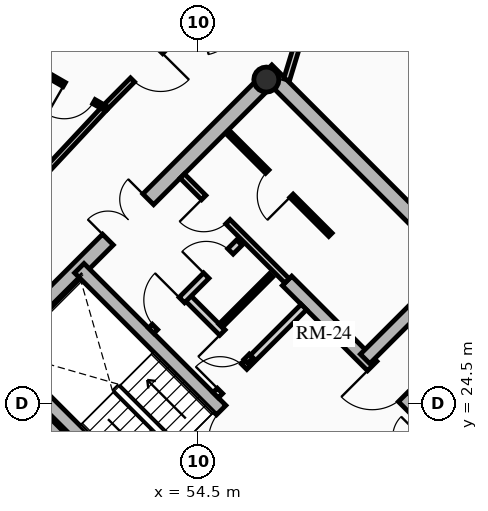
"""IFC4 building model, lengths in metres.
Left out: names, types, materials, properties, quantities, classifications, styles, units other than length and angle.
Written with IfcOpenShell. Run it as: python <this file> out.ifc"""

import sys

from ifc_helpers import new_model, si_unit, direction, frame, frame_2d, origin, origin_2d, place, context, subcontext, project, spatial, rectangle, hollow_circle, extrude, source, transform, mapped, element, fill, save


model = new_model("IFC4")
c1 = context("Model", 3, precision=1e-05, world=origin(), true_north=direction((0.0, 1.0)))
c2 = subcontext(c1, "Body", "Model", "MODEL_VIEW")
j1 = project(units=[si_unit("LENGTHUNIT", "METRE"), si_unit("PLANEANGLEUNIT", "RADIAN")], contexts=[c1])
p1 = place(None, origin())
s1 = spatial("IfcSite", under=j1, at=p1, CompositionType="ELEMENT")
p2 = place(p1, origin())
s2 = spatial("IfcBuilding", under=s1, at=p2, CompositionType="ELEMENT")
p3 = place(p2, frame((0.0, 0.0, 208.3)))
s3 = spatial("IfcBuildingStorey", under=s2, at=p3, CompositionType="ELEMENT", Elevation=208.3)
for number, where, z_axis, x_axis in (
    (1, (58.702, 15.732, 0.0), (0.0, 0.0, 1.0), (-0.707, 0.707, 0.0)),
    (2, (66.268, 23.298, 0.0), (0.0, 0.0, 1.0), (-0.707, 0.707, 0.0)),
):
    element("IfcWall", number, at=place(p3, frame(where, z_axis=z_axis, x_axis=x_axis)), inside=s3, PredefinedType="SHEAR", context=c2, shape_type="SweptSolid", body=[
        extrude(rectangle(XDim=14.1, YDim=0.4, at=frame_2d((7.05, 0.0))), origin(), (0.0, 0.0, 1.0), 2.91),
    ])
p4 = place(p3, frame((48.873, 25.561, 0.0), z_axis=(0.0, 0.0, 1.0), x_axis=(0.707106781187, 0.707106781187, 0.0)))
e3 = element("IfcWall", 3, at=p4, inside=s3, PredefinedType="SHEAR", context=c2, shape_type="SweptSolid", body=[
    extrude(rectangle(XDim=10.7, YDim=0.4, at=frame_2d((5.35, 0.0))), origin(), (0.0, 0.0, 1.0), 2.91),
])
m1 = source(origin(), c2, "Body", "SweptSolid", [
    extrude(rectangle(XDim=1.5, YDim=2.02, at=frame_2d((0.75, 1.01))), frame((0.0, 0.21, 0.0), z_axis=(0.0, -1.0, 0.0), x_axis=(1.0, 0.0, 0.0)), (0.0, 0.0, 1.0), 0.42),
])
p5 = place(p4, frame((4.6, 0.0, 0.0)))
e4 = element("IfcOpeningElement", 4, at=p5, cuts=e3, PredefinedType="OPENING", context=c2, shape_type="MappedRepresentation", body=[
    mapped(m1, transform((0.0, 0.0, 0.0), x_axis=(1.0, 0.0, 0.0), y_axis=(0.0, 1.0, 0.0), z_axis=(0.0, 0.0, 1.0), scale=1.0)),
])
p6 = place(p3, frame((61.06, 18.373, 0.0), z_axis=(0.0, 0.0, 1.0), x_axis=(-0.707106781187, 0.707106781187, 0.0)))
e5 = element("IfcWall", 5, at=p6, inside=s3, PredefinedType="SHEAR", context=c2, shape_type="SweptSolid", body=[
    extrude(rectangle(XDim=13.7, YDim=0.35, at=frame_2d((6.85, 0.0))), origin(), (0.0, 0.0, 1.0), 2.91),
])
m2 = source(origin(), c2, "Body", "SweptSolid", [
    extrude(rectangle(XDim=1.1, YDim=2.015, at=frame_2d((0.55, 1.007))), frame((0.0, 0.185, 0.0), z_axis=(0.0, -1.0, 0.0), x_axis=(1.0, 0.0, 0.0)), (0.0, 0.0, 1.0), 0.37),
])
p7 = place(p6, frame((4.85, 0.0, 0.0)))
e6 = element("IfcOpeningElement", 6, at=p7, cuts=e5, PredefinedType="OPENING", context=c2, shape_type="MappedRepresentation", body=[
    mapped(m2, transform((0.0, 0.0, 0.0), x_axis=(1.0, 0.0, 0.0), y_axis=(0.0, 1.0, 0.0), z_axis=(0.0, 0.0, 1.0), scale=1.0)),
])
p8 = place(p6, frame((0.625, 0.0, 0.0)))
e7 = element("IfcOpeningElement", 7, at=p8, cuts=e5, PredefinedType="OPENING", context=c2, shape_type="MappedRepresentation", body=[
    mapped(m2, transform((0.0, 0.0, 0.0), x_axis=(1.0, 0.0, 0.0), y_axis=(0.0, 1.0, 0.0), z_axis=(0.0, 0.0, 1.0), scale=1.0)),
])
p9 = place(p6, frame((2.625, 0.0, 0.0)))
e8 = element("IfcOpeningElement", 8, at=p9, cuts=e5, PredefinedType="OPENING", context=c2, shape_type="MappedRepresentation", body=[
    mapped(m2, transform((0.0, 0.0, 0.0), x_axis=(1.0, 0.0, 0.0), y_axis=(0.0, 1.0, 0.0), z_axis=(0.0, 0.0, 1.0), scale=1.0)),
])
m3 = source(origin(), c2, "Body", "SweptSolid", [
    extrude(rectangle(XDim=1.15, YDim=2.02, at=frame_2d((0.575, 1.01))), frame((0.0, 0.185, 0.0), z_axis=(0.0, -1.0, 0.0), x_axis=(1.0, 0.0, 0.0)), (0.0, 0.0, 1.0), 0.37),
])
p10 = place(p6, frame((7.27, 0.0, 0.0)))
e9 = element("IfcOpeningElement", 9, at=p10, cuts=e5, PredefinedType="OPENING", context=c2, shape_type="MappedRepresentation", body=[
    mapped(m3, transform((0.0, 0.0, 0.0), x_axis=(1.0, 0.0, 0.0), y_axis=(0.0, 1.0, 0.0), z_axis=(0.0, 0.0, 1.0), scale=1.0)),
])
p11 = place(p3, frame((63.627, 20.94, 0.0), z_axis=(0.0, 0.0, 1.0), x_axis=(-0.707119496762, 0.707094065383, 0.0)))
e10 = element("IfcWall", 10, at=p11, inside=s3, PredefinedType="SHEAR", context=c2, shape_type="SweptSolid", body=[
    extrude(rectangle(XDim=9.6, YDim=0.35, at=frame_2d((4.8, 0.0))), origin(), (0.0, 0.0, 1.0), 2.91),
])
p12 = place(p11, frame((5.28, 0.0, 0.0)))
e11 = element("IfcOpeningElement", 11, at=p12, cuts=e10, PredefinedType="OPENING", context=c2, shape_type="MappedRepresentation", body=[
    mapped(m3, transform((0.0, 0.0, 0.0), x_axis=(1.0, 0.0, 0.0), y_axis=(0.0, 1.0, 0.0), z_axis=(0.0, 0.0, 1.0), scale=1.0)),
])
p13 = place(p3, frame((53.922, 21.141, 0.0), z_axis=(0.0, 0.0, 1.0), x_axis=(-0.707106781187, 0.707106781187, 0.0)))
e12 = element("IfcWall", 12, at=p13, inside=s3, PredefinedType="SHEAR", context=c2, shape_type="SweptSolid", body=[
    extrude(rectangle(XDim=6.695, YDim=0.35, at=frame_2d((3.348, 0.0))), origin(), (0.0, 0.0, 1.0), 2.91),
])
p14 = place(p3, frame((58.893, 25.674, 0.0), z_axis=(0.0, 0.0, 1.0), x_axis=(0.707106781187, 0.707106781187, 0.0)))
e13 = element("IfcWall", 13, at=p14, inside=s3, PredefinedType="SHEAR", context=c2, shape_type="SweptSolid", body=[
    extrude(rectangle(XDim=3.285, YDim=0.35, at=frame_2d((1.643, 0.0))), origin(), (0.0, 0.0, 1.0), 2.91),
])
p15 = place(p3, frame((56.294, 33.024, 0.0), z_axis=(0.0, 0.0, 1.0), x_axis=(0.707106781187, 0.707106781187, 0.0)))
e14 = element("IfcColumn", 14, at=p15, inside=s3, PredefinedType="COLUMN", context=c2, shape_type="SweptSolid", body=[
    extrude(hollow_circle(Radius=0.33, WallThickness=0.025, at=origin_2d()), origin(), (0.0, 0.0, 1.0), 2.91),
])
p16 = place(p3, frame((58.214, 21.467, 0.0), z_axis=(0.0, 0.0, 1.0), x_axis=(0.707106781187, 0.707106781187, 0.0)))
e15 = element("IfcWall", 15, at=p16, inside=s3, PredefinedType="PARTITIONING", context=c2, shape_type="SweptSolid", body=[
    extrude(rectangle(XDim=3.28, YDim=0.2, at=frame_2d((1.64, 0.0))), origin(), (0.0, 0.0, 1.0), 2.685),
])
m4 = source(origin(), c2, "Body", "SweptSolid", [
    extrude(rectangle(XDim=1.5, YDim=2.02, at=frame_2d((0.75, 1.01))), frame((0.0, 0.11, 0.0), z_axis=(0.0, -1.0, 0.0), x_axis=(1.0, 0.0, 0.0)), (0.0, 0.0, 1.0), 0.22),
])
p17 = place(p16, frame((1.55, 0.0, 0.0)))
e16 = element("IfcOpeningElement", 16, at=p17, cuts=e15, PredefinedType="OPENING", context=c2, shape_type="MappedRepresentation", body=[
    mapped(m4, transform((0.0, 0.0, 0.0), x_axis=(1.0, 0.0, 0.0), y_axis=(0.0, 1.0, 0.0), z_axis=(0.0, 0.0, 1.0), scale=1.0)),
])
p18 = place(p3, frame((54.961, 24.719, 0.0), z_axis=(0.0, 0.0, 1.0), x_axis=(0.707106781187, 0.707106781187, 0.0)))
e17 = element("IfcWall", 17, at=p18, inside=s3, PredefinedType="PARTITIONING", context=c2, shape_type="SweptSolid", body=[
    extrude(rectangle(XDim=3.28, YDim=0.2, at=frame_2d((1.64, 0.0))), origin(), (0.0, 0.0, 1.0), 2.685),
])
m5 = source(origin(), c2, "Body", "SweptSolid", [
    extrude(rectangle(XDim=0.9, YDim=2.005, at=frame_2d((0.45, 1.002))), frame((0.0, 0.11, 0.0), z_axis=(0.0, -1.0, 0.0), x_axis=(1.0, 0.0, 0.0)), (0.0, 0.0, 1.0), 0.22),
])
p19 = place(p18, frame((0.16, 0.0, 0.0)))
e18 = element("IfcOpeningElement", 18, at=p19, cuts=e17, PredefinedType="OPENING", context=c2, shape_type="MappedRepresentation", body=[
    mapped(m5, transform((0.0, 0.0, 0.0), x_axis=(1.0, 0.0, 0.0), y_axis=(0.0, 1.0, 0.0), z_axis=(0.0, 0.0, 1.0), scale=1.0)),
])
p20 = place(p3, frame((55.874, 25.631, 0.0), z_axis=(0.0, 0.0, 1.0), x_axis=(-0.707157639372, 0.707055919343, 0.0)))
e19 = element("IfcWall", 19, at=p20, inside=s3, PredefinedType="PARTITIONING", context=c2, shape_type="SweptSolid", body=[
    extrude(rectangle(XDim=2.4, YDim=0.2, at=frame_2d((1.2, 0.0))), origin(), (0.0, 0.0, 1.0), 2.685),
])
p21 = place(p20, frame((0.14, 0.0, 0.0)))
e20 = element("IfcOpeningElement", 20, at=p21, cuts=e19, PredefinedType="OPENING", context=c2, shape_type="MappedRepresentation", body=[
    mapped(m5, transform((0.0, 0.0, 0.0), x_axis=(1.0, 0.0, 0.0), y_axis=(0.0, 1.0, 0.0), z_axis=(0.0, 0.0, 1.0), scale=1.0)),
])
p22 = place(p3, frame((53.264, 26.416, 0.0), z_axis=(0.0, 0.0, 1.0), x_axis=(0.707106781187, 0.707106781187, 0.0)))
e21 = element("IfcWall", 21, at=p22, inside=s3, PredefinedType="PARTITIONING", context=c2, shape_type="SweptSolid", body=[
    extrude(rectangle(XDim=3.28, YDim=0.2, at=frame_2d((1.64, 0.0))), origin(), (0.0, 0.0, 1.0), 2.685),
])
m6 = source(origin(), c2, "Body", "SweptSolid", [
    extrude(rectangle(XDim=1.0, YDim=2.015, at=frame_2d((0.5, 1.007))), frame((0.0, 0.11, 0.0), z_axis=(0.0, -1.0, 0.0), x_axis=(1.0, 0.0, 0.0)), (0.0, 0.0, 1.0), 0.22),
])
p23 = place(p22, frame((0.14, 0.0, 0.0)))
e22 = element("IfcOpeningElement", 22, at=p23, cuts=e21, PredefinedType="OPENING", context=c2, shape_type="MappedRepresentation", body=[
    mapped(m6, transform((0.0, 0.0, 0.0), x_axis=(1.0, 0.0, 0.0), y_axis=(0.0, 1.0, 0.0), z_axis=(0.0, 0.0, 1.0), scale=1.0)),
])
p24 = place(p22, frame((2.05, 0.0, 0.0)))
e23 = element("IfcOpeningElement", 23, at=p24, cuts=e21, PredefinedType="OPENING", context=c2, shape_type="MappedRepresentation", body=[
    mapped(m5, transform((0.0, 0.0, 0.0), x_axis=(1.0, 0.0, 0.0), y_axis=(0.0, 1.0, 0.0), z_axis=(0.0, 0.0, 1.0), scale=1.0)),
])
p25 = place(p3, frame((55.089, 26.543, 0.0), z_axis=(0.0, 0.0, 1.0), x_axis=(0.707106781187, 0.707106781187, 0.0)))
e24 = element("IfcWall", 24, at=p25, inside=s3, PredefinedType="PARTITIONING", context=c2, shape_type="SweptSolid", body=[
    extrude(rectangle(XDim=1.88, YDim=0.125, at=frame_2d((0.94, 0.0))), origin(), (0.0, 0.0, 1.0), 2.685),
])
p26 = place(p3, frame((56.839, 27.728, 0.0), z_axis=(0.0, 0.0, 1.0), x_axis=(-0.707106781187, 0.707106781187, 0.0)))
e25 = element("IfcWall", 25, at=p26, inside=s3, PredefinedType="PARTITIONING", context=c2, shape_type="SweptSolid", body=[
    extrude(rectangle(XDim=3.9, YDim=0.16, at=frame_2d((1.95, 0.0))), origin(), (0.0, 0.0, 1.0), 2.685),
])
m7 = source(origin(), c2, "Body", "SweptSolid", [
    extrude(rectangle(XDim=0.9, YDim=2.005, at=frame_2d((0.45, 1.002))), frame((0.0, 0.09, 0.0), z_axis=(0.0, -1.0, 0.0), x_axis=(1.0, 0.0, 0.0)), (0.0, 0.0, 1.0), 0.18),
])
p27 = place(p26, frame((2.2, 0.0, 0.0)))
e26 = element("IfcOpeningElement", 26, at=p27, cuts=e25, PredefinedType="OPENING", context=c2, shape_type="MappedRepresentation", body=[
    mapped(m7, transform((0.0, 0.0, 0.0), x_axis=(1.0, 0.0, 0.0), y_axis=(0.0, 1.0, 0.0), z_axis=(0.0, 0.0, 1.0), scale=1.0)),
])
p28 = place(p3, frame((57.981, 28.941, 0.0), z_axis=(0.0, 0.0, 1.0), x_axis=(-0.707074823725, 0.707138737204, 0.0)))
e27 = element("IfcWall", 27, at=p28, inside=s3, PredefinedType="PARTITIONING", context=c2, shape_type="SweptSolid", body=[
    extrude(rectangle(XDim=3.82, YDim=0.125, at=frame_2d((1.91, 0.0))), origin(), (0.0, 0.0, 1.0), 2.685),
])
m8 = source(origin(), c2, "Body", "SweptSolid", [
    extrude(rectangle(XDim=0.9, YDim=2.005, at=frame_2d((0.45, 1.002))), frame((0.0, 0.073, 0.0), z_axis=(0.0, -1.0, 0.0), x_axis=(1.0, 0.0, 0.0)), (0.0, 0.0, 1.0), 0.145),
])
p29 = place(p28, frame((1.45, 0.0, 0.0)))
e28 = element("IfcOpeningElement", 28, at=p29, cuts=e27, PredefinedType="OPENING", context=c2, shape_type="MappedRepresentation", body=[
    mapped(m8, transform((0.0, 0.0, 0.0), x_axis=(1.0, 0.0, 0.0), y_axis=(0.0, 1.0, 0.0), z_axis=(0.0, 0.0, 1.0), scale=1.0)),
])
p30 = place(p3, frame((54.427, 34.683, 0.0), z_axis=(0.0, 0.0, 1.0), x_axis=(-0.704178989986, -0.710022499687, 0.0)))
e29 = element("IfcWall", 29, at=p30, inside=s3, PredefinedType="PARTITIONING", context=c2, shape_type="SweptSolid", body=[
    extrude(rectangle(XDim=3.384, YDim=0.15, at=frame_2d((1.692, 0.0))), origin(), (0.0, 0.0, 1.0), 2.322),
])
m9 = source(origin(), c2, "Body", "SweptSolid", [
    extrude(rectangle(XDim=1.05, YDim=2.015, at=frame_2d((0.525, 1.007))), frame((0.0, 0.085, 0.0), z_axis=(0.0, -1.0, 0.0), x_axis=(1.0, 0.0, 0.0)), (0.0, 0.0, 1.0), 0.17),
])
p31 = place(p30, frame((1.298, 0.0, 0.0)))
e30 = element("IfcOpeningElement", 30, at=p31, cuts=e29, PredefinedType="OPENING", context=c2, shape_type="MappedRepresentation", body=[
    mapped(m9, transform((0.0, 0.0, 0.0), x_axis=(1.0, 0.0, 0.0), y_axis=(0.0, 1.0, 0.0), z_axis=(0.0, 0.0, 1.0), scale=1.0)),
])
p32 = place(p3, frame((52.043, 32.28, 0.0), z_axis=(0.0, 0.0, 1.0), x_axis=(-0.682606081633, -0.730786519661, 0.0)))
e31 = element("IfcWall", 31, at=p32, inside=s3, PredefinedType="PARTITIONING", context=c2, shape_type="SweptSolid", body=[
    extrude(rectangle(XDim=6.527, YDim=0.15, at=frame_2d((3.263, 0.0))), origin(), (0.0, 0.0, 1.0), 2.255),
])
p33 = place(p3, frame((56.828, 33.021, 0.0), z_axis=(0.0, 0.0, 1.0), x_axis=(0.292139093972, 0.956375841274, 0.0)))
e32 = element("IfcWall", 32, at=p33, inside=s3, PredefinedType="PARTITIONING", context=c2, shape_type="SweptSolid", body=[
    extrude(rectangle(XDim=2.186, YDim=0.16, at=frame_2d((1.093, 0.0))), origin(), (0.0, 0.0, 1.0), 2.255),
])
m10 = source(origin(), c2, "Body", "SweptSolid", [
    extrude(rectangle(XDim=1.05, YDim=2.015, at=frame_2d((0.525, 1.007))), frame((0.0, 0.09, 0.0), z_axis=(0.0, -1.0, 0.0), x_axis=(1.0, 0.0, 0.0)), (0.0, 0.0, 1.0), 0.18),
])
p34 = place(p33, frame((0.936, 0.0, 0.0)))
e33 = element("IfcOpeningElement", 33, at=p34, cuts=e32, PredefinedType="OPENING", context=c2, shape_type="MappedRepresentation", body=[
    mapped(m10, transform((0.0, 0.0, 0.0), x_axis=(1.0, 0.0, 0.0), y_axis=(0.0, 1.0, 0.0), z_axis=(0.0, 0.0, 1.0), scale=1.0)),
])
p35 = place(p3, frame((52.043, 32.28, 0.0), z_axis=(0.0, 0.0, 1.0), x_axis=(-0.866853616581, 0.498562741709, 0.0)))
e34 = element("IfcWall", 34, at=p35, inside=s3, PredefinedType="PARTITIONING", context=c2, shape_type="SweptSolid", body=[
    extrude(rectangle(XDim=6.308, YDim=0.125, at=frame_2d((3.154, 0.0))), origin(), (0.0, 0.0, 1.0), 2.322),
])
p36 = place(p35, frame((0.33, 0.0, 0.0)))
e35 = element("IfcOpeningElement", 35, at=p36, cuts=e34, PredefinedType="OPENING", context=c2, shape_type="MappedRepresentation", body=[
    mapped(m8, transform((0.0, 0.0, 0.0), x_axis=(1.0, 0.0, 0.0), y_axis=(0.0, 1.0, 0.0), z_axis=(0.0, 0.0, 1.0), scale=1.0)),
])
m11 = source(origin(), c2, "Body", "SweptSolid", [
    extrude(rectangle(XDim=1.15, YDim=2.02, at=frame_2d((0.575, 1.01))), frame((0.0, 0.025, 0.0), z_axis=(0.0, -1.0, 0.0), x_axis=(1.0, 0.0, 0.0)), (0.0, 0.0, 1.0), 0.05),
])
p37 = place(p10, origin())
e36 = element("IfcDoor", 36, at=p37, inside=s3, OperationType="SINGLE_SWING_LEFT", PredefinedType="DOOR", context=c2, shape_type="MappedRepresentation", body=[
    mapped(m11, transform((0.0, 0.0, 0.0), x_axis=(1.0, 0.0, 0.0), y_axis=(0.0, 1.0, 0.0), z_axis=(0.0, 0.0, 1.0), scale=1.0)),
])
fill(e9, e36)
p38 = place(p12, origin())
e37 = element("IfcDoor", 37, at=p38, inside=s3, OperationType="SINGLE_SWING_RIGHT", PredefinedType="DOOR", context=c2, shape_type="MappedRepresentation", body=[
    mapped(m11, transform((0.0, 0.0, 0.0), x_axis=(1.0, 0.0, 0.0), y_axis=(0.0, 1.0, 0.0), z_axis=(0.0, 0.0, 1.0), scale=1.0)),
])
fill(e11, e37)
m12 = source(origin(), c2, "Body", "SweptSolid", [
    extrude(rectangle(XDim=1.5, YDim=2.02, at=frame_2d((0.75, 1.01))), frame((0.0, 0.025, 0.0), z_axis=(0.0, -1.0, 0.0), x_axis=(1.0, 0.0, 0.0)), (0.0, 0.0, 1.0), 0.05),
])
p39 = place(p5, origin())
e38 = element("IfcDoor", 38, at=p39, inside=s3, OperationType="DOUBLE_DOOR_SINGLE_SWING", PredefinedType="DOOR", context=c2, shape_type="MappedRepresentation", body=[
    mapped(m12, transform((0.0, 0.0, 0.0), x_axis=(1.0, 0.0, 0.0), y_axis=(0.0, 1.0, 0.0), z_axis=(0.0, 0.0, 1.0), scale=1.0)),
])
fill(e4, e38)
m13 = source(origin(), c2, "Body", "SweptSolid", [
    extrude(rectangle(XDim=0.9, YDim=2.005, at=frame_2d((0.45, 1.002))), frame((0.0, 0.025, 0.0), z_axis=(0.0, -1.0, 0.0), x_axis=(1.0, 0.0, 0.0)), (0.0, 0.0, 1.0), 0.05),
])
p40 = place(p19, origin())
e39 = element("IfcDoor", 39, at=p40, inside=s3, OperationType="SINGLE_SWING_LEFT", PredefinedType="DOOR", context=c2, shape_type="MappedRepresentation", body=[
    mapped(m13, transform((0.0, 0.0, 0.0), x_axis=(1.0, 0.0, 0.0), y_axis=(0.0, 1.0, 0.0), z_axis=(0.0, 0.0, 1.0), scale=1.0)),
])
fill(e18, e39)
m14 = source(origin(), c2, "Body", "SweptSolid", [
    extrude(rectangle(XDim=1.0, YDim=2.015, at=frame_2d((0.5, 1.007))), frame((0.0, 0.025, 0.0), z_axis=(0.0, -1.0, 0.0), x_axis=(1.0, 0.0, 0.0)), (0.0, 0.0, 1.0), 0.05),
])
p41 = place(p23, origin())
e40 = element("IfcDoor", 40, at=p41, inside=s3, OperationType="SINGLE_SWING_RIGHT", PredefinedType="DOOR", context=c2, shape_type="MappedRepresentation", body=[
    mapped(m14, transform((0.0, 0.0, 0.0), x_axis=(1.0, 0.0, 0.0), y_axis=(0.0, 1.0, 0.0), z_axis=(0.0, 0.0, 1.0), scale=1.0)),
])
fill(e22, e40)
p42 = place(p21, origin())
e41 = element("IfcDoor", 41, at=p42, inside=s3, OperationType="SINGLE_SWING_RIGHT", PredefinedType="DOOR", context=c2, shape_type="MappedRepresentation", body=[
    mapped(m13, transform((0.0, 0.0, 0.0), x_axis=(1.0, 0.0, 0.0), y_axis=(0.0, 1.0, 0.0), z_axis=(0.0, 0.0, 1.0), scale=1.0)),
])
fill(e20, e41)
p43 = place(p24, origin())
e42 = element("IfcDoor", 42, at=p43, inside=s3, OperationType="SINGLE_SWING_LEFT", PredefinedType="DOOR", context=c2, shape_type="MappedRepresentation", body=[
    mapped(m13, transform((0.0, 0.0, 0.0), x_axis=(1.0, 0.0, 0.0), y_axis=(0.0, 1.0, 0.0), z_axis=(0.0, 0.0, 1.0), scale=1.0)),
])
fill(e23, e42)
p44 = place(p27, origin())
e43 = element("IfcDoor", 43, at=p44, inside=s3, OperationType="SINGLE_SWING_RIGHT", PredefinedType="DOOR", context=c2, shape_type="MappedRepresentation", body=[
    mapped(m13, transform((0.0, 0.0, 0.0), x_axis=(1.0, 0.0, 0.0), y_axis=(0.0, 1.0, 0.0), z_axis=(0.0, 0.0, 1.0), scale=1.0)),
])
fill(e26, e43)
p45 = place(p29, origin())
e44 = element("IfcDoor", 44, at=p45, inside=s3, OperationType="SINGLE_SWING_LEFT", PredefinedType="DOOR", context=c2, shape_type="MappedRepresentation", body=[
    mapped(m13, transform((0.0, 0.0, 0.0), x_axis=(1.0, 0.0, 0.0), y_axis=(0.0, 1.0, 0.0), z_axis=(0.0, 0.0, 1.0), scale=1.0)),
])
fill(e28, e44)
m15 = source(origin(), c2, "Body", "SweptSolid", [
    extrude(rectangle(XDim=1.05, YDim=2.015, at=frame_2d((0.525, 1.007))), frame((0.0, 0.025, 0.0), z_axis=(0.0, -1.0, 0.0), x_axis=(1.0, 0.0, 0.0)), (0.0, 0.0, 1.0), 0.05),
])
p46 = place(p31, origin())
e45 = element("IfcDoor", 45, at=p46, inside=s3, OperationType="SINGLE_SWING_LEFT", PredefinedType="DOOR", context=c2, shape_type="MappedRepresentation", body=[
    mapped(m15, transform((0.0, 0.0, 0.0), x_axis=(1.0, 0.0, 0.0), y_axis=(0.0, 1.0, 0.0), z_axis=(0.0, 0.0, 1.0), scale=1.0)),
])
fill(e30, e45)
p47 = place(p36, origin())
e46 = element("IfcDoor", 46, at=p47, inside=s3, OperationType="SINGLE_SWING_RIGHT", PredefinedType="DOOR", context=c2, shape_type="MappedRepresentation", body=[
    mapped(m13, transform((0.0, 0.0, 0.0), x_axis=(1.0, 0.0, 0.0), y_axis=(0.0, 1.0, 0.0), z_axis=(0.0, 0.0, 1.0), scale=1.0)),
])
fill(e35, e46)
save(model, sys.argv[1])
